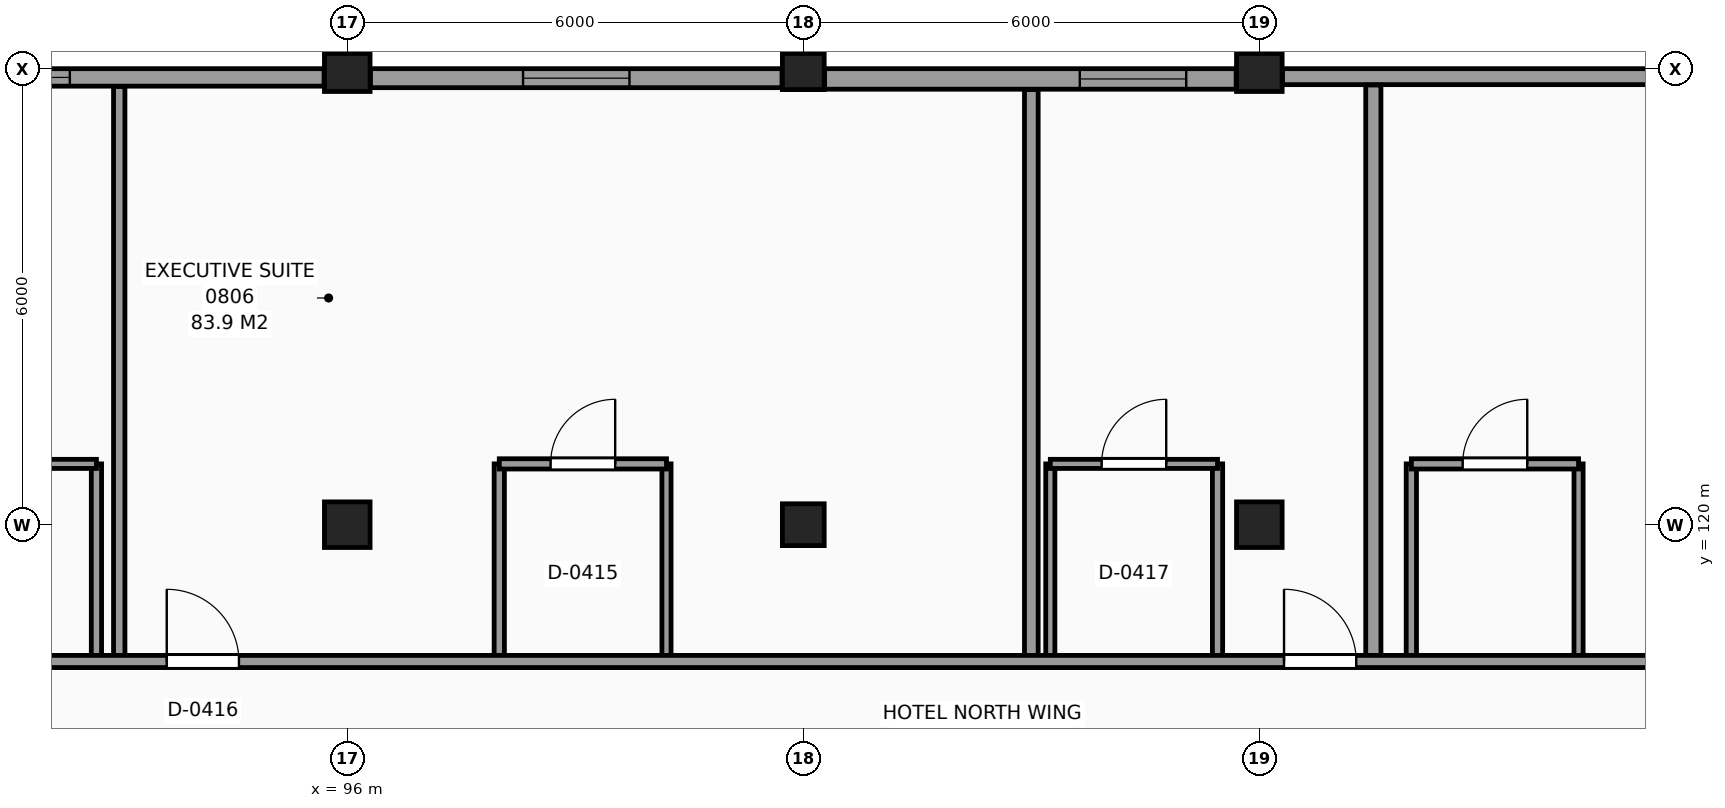
"""IFC4 building model, lengths in metres.
Left out: names, types, materials, properties, quantities, classifications, styles, units other than length and angle.
Written with IfcOpenShell. Run it as: python <this file> out.ifc"""

import sys

from ifc_helpers import new_model, si_unit, direction, frame, frame_2d, origin, origin_2d, place, context, subcontext, project, spatial, rectangle, extrude, element, fill, save


model = new_model("IFC4")
c1 = context("Model", 3, precision=1e-05, world=origin(), true_north=direction((0.0, 1.0)))
c2 = subcontext(c1, "Body", "Model", "MODEL_VIEW")
j1 = project(units=[si_unit("LENGTHUNIT", "METRE"), si_unit("PLANEANGLEUNIT", "RADIAN")], contexts=[c1])
p1 = place(None, origin())
s1 = spatial("IfcSite", under=j1, at=p1, CompositionType="ELEMENT")
p2 = place(p1, origin())
s2 = spatial("IfcBuilding", under=s1, at=p2, CompositionType="ELEMENT")
p3 = place(p2, frame((0.0, 0.0, 34.8)))
s3 = spatial("IfcBuildingStorey", under=s2, at=p3, CompositionType="ELEMENT", Elevation=34.8)
for number, where, z_axis, x_axis in (
    (1, (96.0, 120.0, 0.0), (0.0, 0.0, 1.0), (1.0, 0.0, 0.0)),
    (2, (96.0, 126.0, 0.0), (0.0, 0.0, 1.0), (1.0, 0.0, 0.0)),
):
    element("IfcColumn", number, at=place(p3, frame(where, z_axis=z_axis, x_axis=x_axis)), inside=s3, PredefinedType="COLUMN", context=c2, shape_type="SweptSolid", body=[
        extrude(rectangle(XDim=0.6, YDim=0.6, at=origin_2d()), origin(), (0.0, 0.0, 1.0), 3.3),
    ])
for number, where, z_axis, x_axis in (
    (3, (102.0, 120.0, 0.0), (0.0, 0.0, 1.0), (1.0, 0.0, 0.0)),
    (4, (102.0, 126.0, 0.0), (0.0, 0.0, 1.0), (1.0, 0.0, 0.0)),
):
    element("IfcColumn", number, at=place(p3, frame(where, z_axis=z_axis, x_axis=x_axis)), inside=s3, PredefinedType="COLUMN", context=c2, shape_type="SweptSolid", body=[
        extrude(rectangle(XDim=0.55, YDim=0.55, at=origin_2d()), origin(), (0.0, 0.0, 1.0), 3.3),
    ])
for number, where, z_axis, x_axis in (
    (5, (108.0, 120.0, 0.0), (0.0, 0.0, 1.0), (1.0, 0.0, 0.0)),
    (6, (108.0, 126.0, 0.0), (0.0, 0.0, 1.0), (1.0, 0.0, 0.0)),
):
    element("IfcColumn", number, at=place(p3, frame(where, z_axis=z_axis, x_axis=x_axis)), inside=s3, PredefinedType="COLUMN", context=c2, shape_type="SweptSolid", body=[
        extrude(rectangle(XDim=0.6, YDim=0.6, at=origin_2d()), origin(), (0.0, 0.0, 1.0), 3.3),
    ])
p4 = place(p3, frame((113.72, 125.895, 0.0), z_axis=(0.0, 0.0, 1.0), x_axis=(-1.0, 0.0, 0.0)))
e7 = element("IfcWall", 7, at=p4, inside=s3, PredefinedType="SOLIDWALL", context=c2, shape_type="SweptSolid", body=[
    extrude(rectangle(XDim=5.415, YDim=0.21, at=frame_2d((2.708, 0.0))), origin(), (0.0, 0.0, 1.0), 2.42),
])
p5 = place(p3, frame((107.695, 125.865, 0.0), z_axis=(0.0, 0.0, 1.0), x_axis=(-1.0, 0.0, 0.0)))
e8 = element("IfcWall", 8, at=p5, inside=s3, PredefinedType="SOLIDWALL", context=c2, shape_type="SweptSolid", body=[
    extrude(rectangle(XDim=5.415, YDim=0.27, at=frame_2d((2.708, 0.0))), origin(), (0.0, 0.0, 1.0), 2.42),
])
p6 = place(p5, frame((0.657, 0.0, 0.8)))
e9 = element("IfcOpeningElement", 9, at=p6, cuts=e8, PredefinedType="OPENING", context=c2, shape_type="SweptSolid", body=[
    extrude(rectangle(XDim=1.4, YDim=1.4, at=frame_2d((0.7, 0.7))), frame((0.0, 0.145, 0.0), z_axis=(0.0, -1.0, 0.0), x_axis=(1.0, 0.0, 0.0)), (0.0, 0.0, 1.0), 0.29),
])
p7 = place(p3, frame((101.72, 125.875, 0.0), z_axis=(0.0, 0.0, 1.0), x_axis=(-1.0, 0.0, 0.0)))
e10 = element("IfcWall", 10, at=p7, inside=s3, PredefinedType="SOLIDWALL", context=c2, shape_type="SweptSolid", body=[
    extrude(rectangle(XDim=5.415, YDim=0.25, at=frame_2d((2.708, 0.0))), origin(), (0.0, 0.0, 1.0), 2.445),
])
p8 = place(p7, frame((2.007, 0.0, 0.8)))
e11 = element("IfcOpeningElement", 11, at=p8, cuts=e10, PredefinedType="OPENING", context=c2, shape_type="SweptSolid", body=[
    extrude(rectangle(XDim=1.4, YDim=1.4, at=frame_2d((0.7, 0.7))), frame((0.0, 0.135, 0.0), z_axis=(0.0, -1.0, 0.0), x_axis=(1.0, 0.0, 0.0)), (0.0, 0.0, 1.0), 0.27),
])
p9 = place(p3, frame((95.695, 125.885, 0.0), z_axis=(0.0, 0.0, 1.0), x_axis=(-1.0, 0.0, 0.0)))
e12 = element("IfcWall", 12, at=p9, inside=s3, PredefinedType="SOLIDWALL", context=c2, shape_type="SweptSolid", body=[
    extrude(rectangle(XDim=5.415, YDim=0.23, at=frame_2d((2.708, 0.0))), origin(), (0.0, 0.0, 1.0), 2.445),
])
p10 = place(p9, frame((3.345, 0.0, 0.8)))
e13 = element("IfcOpeningElement", 13, at=p10, cuts=e12, PredefinedType="OPENING", context=c2, shape_type="SweptSolid", body=[
    extrude(rectangle(XDim=1.4, YDim=1.4, at=frame_2d((0.7, 0.7))), frame((0.0, 0.125, 0.0), z_axis=(0.0, -1.0, 0.0), x_axis=(1.0, 0.0, 0.0)), (0.0, 0.0, 1.0), 0.25),
])
p11 = place(p3, frame((92.7, 118.2, 0.0), z_axis=(0.0, 0.0, 1.0), x_axis=(0.0, 1.0, 0.0)))
e14 = element("IfcWall", 14, at=p11, inside=s3, PredefinedType="PARTITIONING", context=c2, shape_type="SweptSolid", body=[
    extrude(rectangle(XDim=2.6, YDim=0.135, at=frame_2d((1.3, 0.0))), origin(), (0.0, 0.0, 1.0), 3.07),
])
p12 = place(p3, frame((93.0, 118.2, 0.0), z_axis=(0.0, 0.0, 1.0), x_axis=(0.0, 1.0, 0.0)))
e15 = element("IfcWall", 15, at=p12, inside=s3, PredefinedType="PARTITIONING", context=c2, shape_type="SweptSolid", body=[
    extrude(rectangle(XDim=7.565, YDim=0.15, at=frame_2d((3.782, 0.0))), origin(), (0.0, 0.0, 1.0), 3.07),
])
p13 = place(p3, frame((98.0, 118.2, 0.0), z_axis=(0.0, 0.0, 1.0), x_axis=(0.0, 1.0, 0.0)))
e16 = element("IfcWall", 16, at=p13, inside=s3, PredefinedType="PARTITIONING", context=c2, shape_type="SweptSolid", body=[
    extrude(rectangle(XDim=2.6, YDim=0.135, at=frame_2d((1.3, 0.0))), origin(), (0.0, 0.0, 1.0), 3.07),
])
p14 = place(p3, frame((100.2, 118.2, 0.0), z_axis=(0.0, 0.0, 1.0), x_axis=(0.0, 1.0, 0.0)))
e17 = element("IfcWall", 17, at=p14, inside=s3, PredefinedType="PARTITIONING", context=c2, shape_type="SweptSolid", body=[
    extrude(rectangle(XDim=2.6, YDim=0.12, at=frame_2d((1.3, 0.0))), origin(), (0.0, 0.0, 1.0), 3.07),
])
p15 = place(p3, frame((105.0, 118.2, 0.0), z_axis=(0.0, 0.0, 1.0), x_axis=(0.0, 1.0, 0.0)))
e18 = element("IfcWall", 18, at=p15, inside=s3, PredefinedType="PARTITIONING", context=c2, shape_type="SweptSolid", body=[
    extrude(rectangle(XDim=7.525, YDim=0.18, at=frame_2d((3.763, 0.0))), origin(), (0.0, 0.0, 1.0), 3.07),
])
p16 = place(p3, frame((105.25, 118.2, 0.0), z_axis=(0.0, 0.0, 1.0), x_axis=(0.0, 1.0, 0.0)))
e19 = element("IfcWall", 19, at=p16, inside=s3, PredefinedType="PARTITIONING", context=c2, shape_type="SweptSolid", body=[
    extrude(rectangle(XDim=2.6, YDim=0.12, at=frame_2d((1.3, 0.0))), origin(), (0.0, 0.0, 1.0), 3.07),
])
p17 = place(p3, frame((107.45, 118.2, 0.0), z_axis=(0.0, 0.0, 1.0), x_axis=(0.0, 1.0, 0.0)))
e20 = element("IfcWall", 20, at=p17, inside=s3, PredefinedType="PARTITIONING", context=c2, shape_type="SweptSolid", body=[
    extrude(rectangle(XDim=2.6, YDim=0.135, at=frame_2d((1.3, 0.0))), origin(), (0.0, 0.0, 1.0), 3.07),
])
p18 = place(p3, frame((109.5, 118.2, 0.0), z_axis=(0.0, 0.0, 1.0), x_axis=(0.0, 1.0, 0.0)))
e21 = element("IfcWall", 21, at=p18, inside=s3, PredefinedType="PARTITIONING", context=c2, shape_type="SweptSolid", body=[
    extrude(rectangle(XDim=7.585, YDim=0.2, at=frame_2d((3.792, 0.0))), origin(), (0.0, 0.0, 1.0), 3.07),
])
p19 = place(p3, frame((110.0, 118.2, 0.0), z_axis=(0.0, 0.0, 1.0), x_axis=(0.0, 1.0, 0.0)))
e22 = element("IfcWall", 22, at=p19, inside=s3, PredefinedType="PARTITIONING", context=c2, shape_type="SweptSolid", body=[
    extrude(rectangle(XDim=2.6, YDim=0.135, at=frame_2d((1.3, 0.0))), origin(), (0.0, 0.0, 1.0), 3.07),
])
p20 = place(p3, frame((112.2, 118.2, 0.0), z_axis=(0.0, 0.0, 1.0), x_axis=(0.0, 1.0, 0.0)))
e23 = element("IfcWall", 23, at=p20, inside=s3, PredefinedType="PARTITIONING", context=c2, shape_type="SweptSolid", body=[
    extrude(rectangle(XDim=2.6, YDim=0.12, at=frame_2d((1.3, 0.0))), origin(), (0.0, 0.0, 1.0), 3.07),
])
p21 = place(p3, frame((66.275, 118.2, 0.0), z_axis=(0.0, 0.0, 1.0), x_axis=(1.0, 0.0, 0.0)))
e24 = element("IfcWall", 24, at=p21, inside=s3, PredefinedType="PARTITIONING", context=c2, shape_type="SweptSolid", body=[
    extrude(rectangle(XDim=110.225, YDim=0.16, at=frame_2d((55.113, 0.0))), origin(), (0.0, 0.0, 1.0), 3.07),
])
p22 = place(p21, frame((0.45, 0.0, 0.0)))
e25 = element("IfcOpeningElement", 25, at=p22, cuts=e24, PredefinedType="OPENING", context=c2, shape_type="SweptSolid", body=[
    extrude(rectangle(XDim=0.95, YDim=2.1, at=frame_2d((0.475, 1.05))), frame((0.0, 0.09, 0.0), z_axis=(0.0, -1.0, 0.0), x_axis=(1.0, 0.0, 0.0)), (0.0, 0.0, 1.0), 0.18),
])
p23 = place(p21, frame((4.85, 0.0, 0.0)))
e26 = element("IfcOpeningElement", 26, at=p23, cuts=e24, PredefinedType="OPENING", context=c2, shape_type="SweptSolid", body=[
    extrude(rectangle(XDim=0.95, YDim=2.1, at=frame_2d((0.475, 1.05))), frame((0.0, 0.09, 0.0), z_axis=(0.0, -1.0, 0.0), x_axis=(1.0, 0.0, 0.0)), (0.0, 0.0, 1.0), 0.18),
])
p24 = place(p21, frame((9.35, 0.0, 0.0)))
e27 = element("IfcOpeningElement", 27, at=p24, cuts=e24, PredefinedType="OPENING", context=c2, shape_type="SweptSolid", body=[
    extrude(rectangle(XDim=0.95, YDim=2.1, at=frame_2d((0.475, 1.05))), frame((0.0, 0.09, 0.0), z_axis=(0.0, -1.0, 0.0), x_axis=(1.0, 0.0, 0.0)), (0.0, 0.0, 1.0), 0.18),
])
p25 = place(p21, frame((18.45, 0.0, 0.0)))
e28 = element("IfcOpeningElement", 28, at=p25, cuts=e24, PredefinedType="OPENING", context=c2, shape_type="SweptSolid", body=[
    extrude(rectangle(XDim=0.95, YDim=2.1, at=frame_2d((0.475, 1.05))), frame((0.0, 0.09, 0.0), z_axis=(0.0, -1.0, 0.0), x_axis=(1.0, 0.0, 0.0)), (0.0, 0.0, 1.0), 0.18),
])
p26 = place(p21, frame((22.85, 0.0, 0.0)))
e29 = element("IfcOpeningElement", 29, at=p26, cuts=e24, PredefinedType="OPENING", context=c2, shape_type="SweptSolid", body=[
    extrude(rectangle(XDim=0.95, YDim=2.1, at=frame_2d((0.475, 1.05))), frame((0.0, 0.09, 0.0), z_axis=(0.0, -1.0, 0.0), x_axis=(1.0, 0.0, 0.0)), (0.0, 0.0, 1.0), 0.18),
])
p27 = place(p21, frame((27.35, 0.0, 0.0)))
e30 = element("IfcOpeningElement", 30, at=p27, cuts=e24, PredefinedType="OPENING", context=c2, shape_type="SweptSolid", body=[
    extrude(rectangle(XDim=0.95, YDim=2.1, at=frame_2d((0.475, 1.05))), frame((0.0, 0.09, 0.0), z_axis=(0.0, -1.0, 0.0), x_axis=(1.0, 0.0, 0.0)), (0.0, 0.0, 1.0), 0.18),
])
p28 = place(p21, frame((42.05, 0.0, 0.0)))
e31 = element("IfcOpeningElement", 31, at=p28, cuts=e24, PredefinedType="OPENING", context=c2, shape_type="SweptSolid", body=[
    extrude(rectangle(XDim=0.95, YDim=2.1, at=frame_2d((0.475, 1.05))), frame((0.0, 0.09, 0.0), z_axis=(0.0, -1.0, 0.0), x_axis=(1.0, 0.0, 0.0)), (0.0, 0.0, 1.0), 0.18),
])
p29 = place(p21, frame((50.3, 0.0, 0.0)))
e32 = element("IfcOpeningElement", 32, at=p29, cuts=e24, PredefinedType="OPENING", context=c2, shape_type="SweptSolid", body=[
    extrude(rectangle(XDim=0.95, YDim=2.1, at=frame_2d((0.475, 1.05))), frame((0.0, 0.09, 0.0), z_axis=(0.0, -1.0, 0.0), x_axis=(1.0, 0.0, 0.0)), (0.0, 0.0, 1.0), 0.18),
])
p30 = place(p21, frame((52.85, 0.0, 0.0)))
e33 = element("IfcOpeningElement", 33, at=p30, cuts=e24, PredefinedType="OPENING", context=c2, shape_type="SweptSolid", body=[
    extrude(rectangle(XDim=0.95, YDim=2.1, at=frame_2d((0.475, 1.05))), frame((0.0, 0.09, 0.0), z_axis=(0.0, -1.0, 0.0), x_axis=(1.0, 0.0, 0.0)), (0.0, 0.0, 1.0), 0.18),
])
p31 = place(p21, frame((60.05, 0.0, 0.0)))
e34 = element("IfcOpeningElement", 34, at=p31, cuts=e24, PredefinedType="OPENING", context=c2, shape_type="SweptSolid", body=[
    extrude(rectangle(XDim=0.95, YDim=2.1, at=frame_2d((0.475, 1.05))), frame((0.0, 0.09, 0.0), z_axis=(0.0, -1.0, 0.0), x_axis=(1.0, 0.0, 0.0)), (0.0, 0.0, 1.0), 0.18),
])
p32 = place(p21, frame((64.25, 0.0, 0.0)))
e35 = element("IfcOpeningElement", 35, at=p32, cuts=e24, PredefinedType="OPENING", context=c2, shape_type="SweptSolid", body=[
    extrude(rectangle(XDim=0.95, YDim=2.1, at=frame_2d((0.475, 1.05))), frame((0.0, 0.09, 0.0), z_axis=(0.0, -1.0, 0.0), x_axis=(1.0, 0.0, 0.0)), (0.0, 0.0, 1.0), 0.18),
])
p33 = place(p21, frame((66.45, 0.0, 0.0)))
e36 = element("IfcOpeningElement", 36, at=p33, cuts=e24, PredefinedType="OPENING", context=c2, shape_type="SweptSolid", body=[
    extrude(rectangle(XDim=0.95, YDim=2.1, at=frame_2d((0.475, 1.05))), frame((0.0, 0.09, 0.0), z_axis=(0.0, -1.0, 0.0), x_axis=(1.0, 0.0, 0.0)), (0.0, 0.0, 1.0), 0.18),
])
p34 = place(p21, frame((72.45, 0.0, 0.0)))
e37 = element("IfcOpeningElement", 37, at=p34, cuts=e24, PredefinedType="OPENING", context=c2, shape_type="SweptSolid", body=[
    extrude(rectangle(XDim=0.95, YDim=2.1, at=frame_2d((0.475, 1.05))), frame((0.0, 0.09, 0.0), z_axis=(0.0, -1.0, 0.0), x_axis=(1.0, 0.0, 0.0)), (0.0, 0.0, 1.0), 0.18),
])
p35 = place(p21, frame((82.25, 0.0, 0.0)))
e38 = element("IfcOpeningElement", 38, at=p35, cuts=e24, PredefinedType="OPENING", context=c2, shape_type="SweptSolid", body=[
    extrude(rectangle(XDim=0.95, YDim=2.1, at=frame_2d((0.475, 1.05))), frame((0.0, 0.09, 0.0), z_axis=(0.0, -1.0, 0.0), x_axis=(1.0, 0.0, 0.0)), (0.0, 0.0, 1.0), 0.18),
])
p36 = place(p21, frame((84.45, 0.0, 0.0)))
e39 = element("IfcOpeningElement", 39, at=p36, cuts=e24, PredefinedType="OPENING", context=c2, shape_type="SweptSolid", body=[
    extrude(rectangle(XDim=0.95, YDim=2.1, at=frame_2d((0.475, 1.05))), frame((0.0, 0.09, 0.0), z_axis=(0.0, -1.0, 0.0), x_axis=(1.0, 0.0, 0.0)), (0.0, 0.0, 1.0), 0.18),
])
p37 = place(p21, frame((88.85, 0.0, 0.0)))
e40 = element("IfcOpeningElement", 40, at=p37, cuts=e24, PredefinedType="OPENING", context=c2, shape_type="SweptSolid", body=[
    extrude(rectangle(XDim=0.95, YDim=2.1, at=frame_2d((0.475, 1.05))), frame((0.0, 0.09, 0.0), z_axis=(0.0, -1.0, 0.0), x_axis=(1.0, 0.0, 0.0)), (0.0, 0.0, 1.0), 0.18),
])
p38 = place(p21, frame((96.05, 0.0, 0.0)))
e41 = element("IfcOpeningElement", 41, at=p38, cuts=e24, PredefinedType="OPENING", context=c2, shape_type="SweptSolid", body=[
    extrude(rectangle(XDim=0.95, YDim=2.1, at=frame_2d((0.475, 1.05))), frame((0.0, 0.09, 0.0), z_axis=(0.0, -1.0, 0.0), x_axis=(1.0, 0.0, 0.0)), (0.0, 0.0, 1.0), 0.18),
])
p39 = place(p21, frame((104.3, 0.0, 0.0)))
e42 = element("IfcOpeningElement", 42, at=p39, cuts=e24, PredefinedType="OPENING", context=c2, shape_type="SweptSolid", body=[
    extrude(rectangle(XDim=0.95, YDim=2.1, at=frame_2d((0.475, 1.05))), frame((0.0, 0.09, 0.0), z_axis=(0.0, -1.0, 0.0), x_axis=(1.0, 0.0, 0.0)), (0.0, 0.0, 1.0), 0.18),
])
p40 = place(p21, frame((108.45, 0.0, 0.0)))
e43 = element("IfcOpeningElement", 43, at=p40, cuts=e24, PredefinedType="OPENING", context=c2, shape_type="SweptSolid", body=[
    extrude(rectangle(XDim=0.95, YDim=2.1, at=frame_2d((0.475, 1.05))), frame((0.0, 0.09, 0.0), z_axis=(0.0, -1.0, 0.0), x_axis=(1.0, 0.0, 0.0)), (0.0, 0.0, 1.0), 0.18),
])
p41 = place(p3, frame((90.5, 120.8, 0.0), z_axis=(0.0, 0.0, 1.0), x_axis=(1.0, 0.0, 0.0)))
e44 = element("IfcWall", 44, at=p41, inside=s3, PredefinedType="PARTITIONING", context=c2, shape_type="SweptSolid", body=[
    extrude(rectangle(XDim=2.2, YDim=0.12, at=frame_2d((1.1, 0.0))), origin(), (0.0, 0.0, 1.0), 3.07),
])
p42 = place(p41, frame((0.675, 0.0, 0.0)))
e45 = element("IfcOpeningElement", 45, at=p42, cuts=e44, PredefinedType="OPENING", context=c2, shape_type="SweptSolid", body=[
    extrude(rectangle(XDim=0.85, YDim=2.1, at=frame_2d((0.425, 1.05))), frame((0.0, 0.07, 0.0), z_axis=(0.0, -1.0, 0.0), x_axis=(1.0, 0.0, 0.0)), (0.0, 0.0, 1.0), 0.14),
])
p43 = place(p3, frame((98.0, 120.8, 0.0), z_axis=(0.0, 0.0, 1.0), x_axis=(1.0, 0.0, 0.0)))
e46 = element("IfcWall", 46, at=p43, inside=s3, PredefinedType="PARTITIONING", context=c2, shape_type="SweptSolid", body=[
    extrude(rectangle(XDim=2.2, YDim=0.135, at=frame_2d((1.1, 0.0))), origin(), (0.0, 0.0, 1.0), 3.07),
])
p44 = place(p43, frame((0.675, 0.0, 0.0)))
e47 = element("IfcOpeningElement", 47, at=p44, cuts=e46, PredefinedType="OPENING", context=c2, shape_type="SweptSolid", body=[
    extrude(rectangle(XDim=0.85, YDim=2.1, at=frame_2d((0.425, 1.05))), frame((0.0, 0.078, 0.0), z_axis=(0.0, -1.0, 0.0), x_axis=(1.0, 0.0, 0.0)), (0.0, 0.0, 1.0), 0.155),
])
p45 = place(p3, frame((105.25, 120.8, 0.0), z_axis=(0.0, 0.0, 1.0), x_axis=(1.0, 0.0, 0.0)))
e48 = element("IfcWall", 48, at=p45, inside=s3, PredefinedType="PARTITIONING", context=c2, shape_type="SweptSolid", body=[
    extrude(rectangle(XDim=2.2, YDim=0.12, at=frame_2d((1.1, 0.0))), origin(), (0.0, 0.0, 1.0), 3.07),
])
p46 = place(p45, frame((0.675, 0.0, 0.0)))
e49 = element("IfcOpeningElement", 49, at=p46, cuts=e48, PredefinedType="OPENING", context=c2, shape_type="SweptSolid", body=[
    extrude(rectangle(XDim=0.85, YDim=2.1, at=frame_2d((0.425, 1.05))), frame((0.0, 0.07, 0.0), z_axis=(0.0, -1.0, 0.0), x_axis=(1.0, 0.0, 0.0)), (0.0, 0.0, 1.0), 0.14),
])
p47 = place(p3, frame((110.0, 120.8, 0.0), z_axis=(0.0, 0.0, 1.0), x_axis=(1.0, 0.0, 0.0)))
e50 = element("IfcWall", 50, at=p47, inside=s3, PredefinedType="PARTITIONING", context=c2, shape_type="SweptSolid", body=[
    extrude(rectangle(XDim=2.2, YDim=0.135, at=frame_2d((1.1, 0.0))), origin(), (0.0, 0.0, 1.0), 3.07),
])
p48 = place(p47, frame((0.675, 0.0, 0.0)))
e51 = element("IfcOpeningElement", 51, at=p48, cuts=e50, PredefinedType="OPENING", context=c2, shape_type="SweptSolid", body=[
    extrude(rectangle(XDim=0.85, YDim=2.1, at=frame_2d((0.425, 1.05))), frame((0.0, 0.078, 0.0), z_axis=(0.0, -1.0, 0.0), x_axis=(1.0, 0.0, 0.0)), (0.0, 0.0, 1.0), 0.155),
])
p49 = place(p10, origin())
e52 = element("IfcWindow", 52, at=p49, inside=s3, PartitioningType="SINGLE_PANEL", PredefinedType="WINDOW", context=c2, shape_type="SweptSolid", body=[
    extrude(rectangle(XDim=1.4, YDim=1.4, at=frame_2d((0.7, 0.7))), frame((0.0, 0.03, 0.0), z_axis=(0.0, -1.0, 0.0), x_axis=(1.0, 0.0, 0.0)), (0.0, 0.0, 1.0), 0.06),
])
fill(e13, e52)
p50 = place(p8, origin())
e53 = element("IfcWindow", 53, at=p50, inside=s3, PartitioningType="SINGLE_PANEL", PredefinedType="WINDOW", context=c2, shape_type="SweptSolid", body=[
    extrude(rectangle(XDim=1.4, YDim=1.4, at=frame_2d((0.7, 0.7))), frame((0.0, 0.03, 0.0), z_axis=(0.0, -1.0, 0.0), x_axis=(1.0, 0.0, 0.0)), (0.0, 0.0, 1.0), 0.06),
])
fill(e11, e53)
p51 = place(p6, origin())
e54 = element("IfcWindow", 54, at=p51, inside=s3, PartitioningType="SINGLE_PANEL", PredefinedType="WINDOW", context=c2, shape_type="SweptSolid", body=[
    extrude(rectangle(XDim=1.4, YDim=1.4, at=frame_2d((0.7, 0.7))), frame((0.0, 0.03, 0.0), z_axis=(0.0, -1.0, 0.0), x_axis=(1.0, 0.0, 0.0)), (0.0, 0.0, 1.0), 0.06),
])
fill(e9, e54)
p52 = place(p44, origin())
e55 = element("IfcDoor", 55, at=p52, inside=s3, OperationType="SINGLE_SWING_RIGHT", PredefinedType="DOOR", context=c2, shape_type="SweptSolid", body=[
    extrude(rectangle(XDim=0.85, YDim=2.1, at=frame_2d((0.425, 1.05))), frame((0.0, 0.025, 0.0), z_axis=(0.0, -1.0, 0.0), x_axis=(1.0, 0.0, 0.0)), (0.0, 0.0, 1.0), 0.05),
])
fill(e47, e55)
p53 = place(p27, origin())
e56 = element("IfcDoor", 56, at=p53, inside=s3, OperationType="SINGLE_SWING_LEFT", PredefinedType="DOOR", context=c2, shape_type="SweptSolid", body=[
    extrude(rectangle(XDim=0.95, YDim=2.1, at=frame_2d((0.475, 1.05))), frame((0.0, 0.025, 0.0), z_axis=(0.0, -1.0, 0.0), x_axis=(1.0, 0.0, 0.0)), (0.0, 0.0, 1.0), 0.05),
])
fill(e30, e56)
p54 = place(p46, origin())
e57 = element("IfcDoor", 57, at=p54, inside=s3, OperationType="SINGLE_SWING_RIGHT", PredefinedType="DOOR", context=c2, shape_type="SweptSolid", body=[
    extrude(rectangle(XDim=0.85, YDim=2.1, at=frame_2d((0.425, 1.05))), frame((0.0, 0.025, 0.0), z_axis=(0.0, -1.0, 0.0), x_axis=(1.0, 0.0, 0.0)), (0.0, 0.0, 1.0), 0.05),
])
fill(e49, e57)
p55 = place(p28, origin())
e58 = element("IfcDoor", 58, at=p55, inside=s3, OperationType="SINGLE_SWING_LEFT", PredefinedType="DOOR", context=c2, shape_type="SweptSolid", body=[
    extrude(rectangle(XDim=0.95, YDim=2.1, at=frame_2d((0.475, 1.05))), frame((0.0, 0.025, 0.0), z_axis=(0.0, -1.0, 0.0), x_axis=(1.0, 0.0, 0.0)), (0.0, 0.0, 1.0), 0.05),
])
fill(e31, e58)
p56 = place(p48, origin())
e59 = element("IfcDoor", 59, at=p56, inside=s3, OperationType="SINGLE_SWING_RIGHT", PredefinedType="DOOR", context=c2, shape_type="SweptSolid", body=[
    extrude(rectangle(XDim=0.85, YDim=2.1, at=frame_2d((0.425, 1.05))), frame((0.0, 0.025, 0.0), z_axis=(0.0, -1.0, 0.0), x_axis=(1.0, 0.0, 0.0)), (0.0, 0.0, 1.0), 0.05),
])
fill(e51, e59)
save(model, sys.argv[1])
